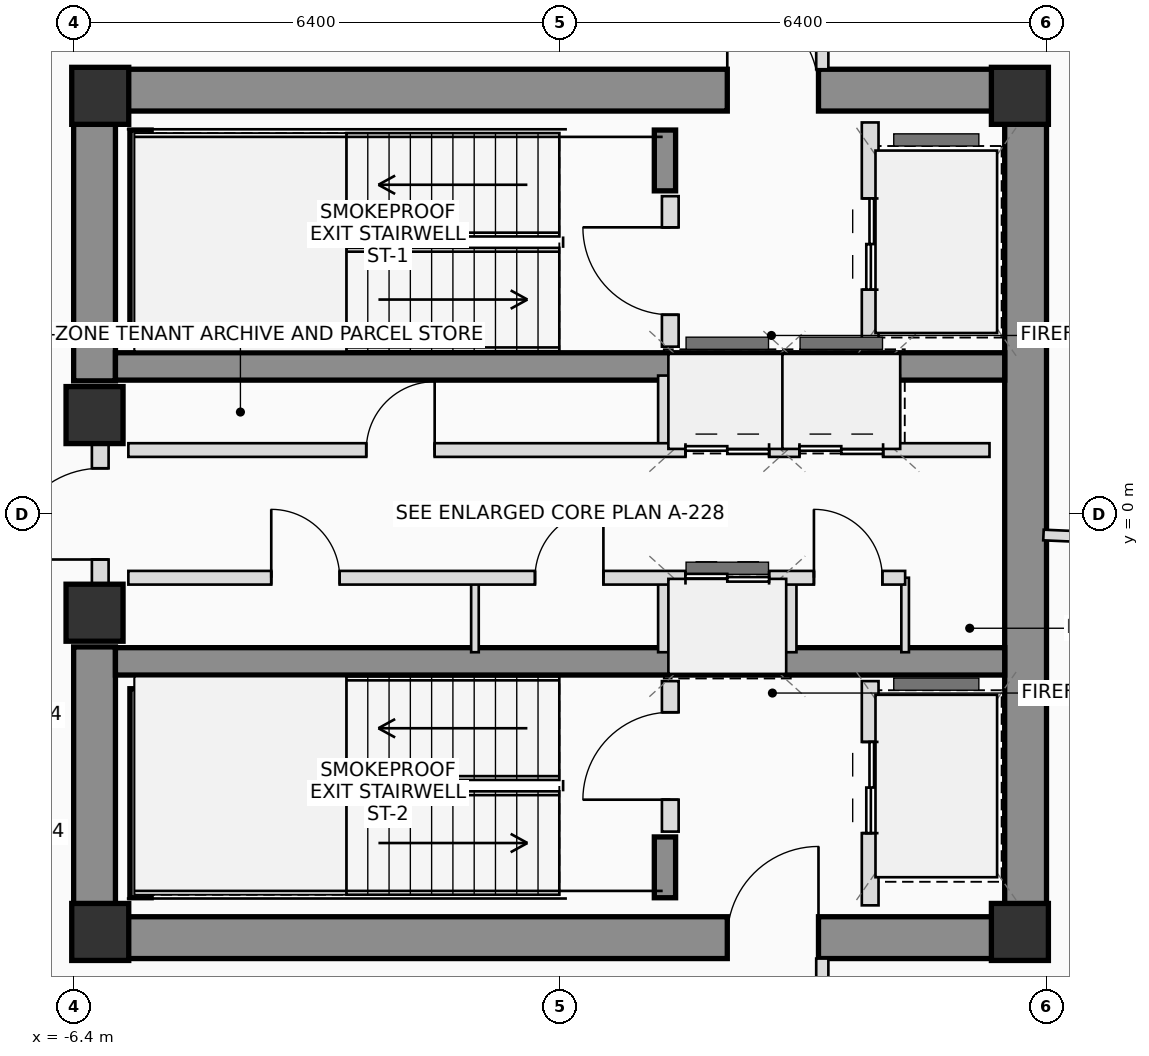
"""IFC4 building model, lengths in metres.
Left out: names, types, materials, properties, quantities, classifications, styles, units other than length and angle.
Written with IfcOpenShell. Run it as: python <this file> out.ifc"""

import sys

from ifc_helpers import new_model, si_unit, direction, frame, frame_2d, origin, origin_2d, place, context, subcontext, project, spatial, rectangle, extrude, source, transform, mapped, element, fill, save


model = new_model("IFC4")
c1 = context("Model", 3, precision=1e-05, world=origin(), true_north=direction((0.0, 1.0)))
c2 = subcontext(c1, "Body", "Model", "MODEL_VIEW")
j1 = project(units=[si_unit("LENGTHUNIT", "METRE"), si_unit("PLANEANGLEUNIT", "RADIAN")], contexts=[c1])
p1 = place(None, origin())
s1 = spatial("IfcSite", under=j1, at=p1, CompositionType="ELEMENT")
p2 = place(p1, origin())
s2 = spatial("IfcBuilding", under=s1, at=p2, CompositionType="ELEMENT")
p3 = place(p2, frame((0.0, 0.0, 314.0)))
s3 = spatial("IfcBuildingStorey", under=s2, at=p3, CompositionType="ELEMENT", Elevation=314.0)
m1 = source(origin(), c2, "Body", "SweptSolid", [
    extrude(rectangle(XDim=0.75, YDim=0.75, at=origin_2d()), origin(), (0.0, 0.0, 1.0), 3.45),
])
for number, where, z_axis, x_axis in (
    (1, (-6.05, -5.5, 0.0), (0.0, 0.0, 1.0), (1.0, 0.0, 0.0)),
    (2, (6.05, -5.5, 0.0), (0.0, 0.0, 1.0), (1.0, 0.0, 0.0)),
    (3, (6.05, 5.5, 0.0), (0.0, 0.0, 1.0), (1.0, 0.0, 0.0)),
    (4, (-6.05, 5.5, 0.0), (0.0, 0.0, 1.0), (1.0, 0.0, 0.0)),
):
    element("IfcColumn", number, at=place(p3, frame(where, z_axis=z_axis, x_axis=x_axis)), inside=s3, PredefinedType="COLUMN", context=c2, shape_type="MappedRepresentation", body=[
        mapped(m1, transform((0.0, 0.0, 0.0), scale=1.0)),
    ])
p4 = place(p3, frame((-6.4, 5.575, 0.0), z_axis=(0.0, 0.0, 1.0), x_axis=(1.0, 0.0, 0.0)))
e5 = element("IfcWall", 5, at=p4, inside=s3, PredefinedType="SHEAR", context=c2, shape_type="SweptSolid", body=[
    extrude(rectangle(XDim=12.8, YDim=0.55, at=frame_2d((6.4, 0.0))), origin(), (0.0, 0.0, 1.0), 3.45),
])
p5 = place(p4, frame((8.6, 0.0, 0.0)))
e6 = element("IfcOpeningElement", 6, at=p5, cuts=e5, PredefinedType="OPENING", context=c2, shape_type="SweptSolid", body=[
    extrude(rectangle(XDim=1.2, YDim=2.2, at=frame_2d((0.6, 1.1))), frame((0.0, 0.285, 0.0), z_axis=(0.0, -1.0, 0.0), x_axis=(1.0, 0.0, 0.0)), (0.0, 0.0, 1.0), 0.57),
])
p6 = place(p3, frame((-6.4, -5.575, 0.0), z_axis=(0.0, 0.0, 1.0), x_axis=(1.0, 0.0, 0.0)))
e7 = element("IfcWall", 7, at=p6, inside=s3, PredefinedType="SHEAR", context=c2, shape_type="SweptSolid", body=[
    extrude(rectangle(XDim=12.8, YDim=0.55, at=frame_2d((6.4, 0.0))), origin(), (0.0, 0.0, 1.0), 3.45),
])
p7 = place(p6, frame((8.6, 0.0, 0.0)))
e8 = element("IfcOpeningElement", 8, at=p7, cuts=e7, PredefinedType="OPENING", context=c2, shape_type="SweptSolid", body=[
    extrude(rectangle(XDim=1.2, YDim=2.2, at=frame_2d((0.6, 1.1))), frame((0.0, 0.285, 0.0), z_axis=(0.0, -1.0, 0.0), x_axis=(1.0, 0.0, 0.0)), (0.0, 0.0, 1.0), 0.57),
])
p8 = place(p3, frame((6.125, -5.3, 0.0), z_axis=(0.0, 0.0, 1.0), x_axis=(0.0, 1.0, 0.0)))
e9 = element("IfcWall", 9, at=p8, inside=s3, PredefinedType="SHEAR", context=c2, shape_type="SweptSolid", body=[
    extrude(rectangle(XDim=10.6, YDim=0.55, at=frame_2d((5.3, 0.0))), origin(), (0.0, 0.0, 1.0), 3.45),
])
for number, where, z_axis, x_axis in (
    (10, (-6.125, -5.3, 0.0), (0.0, 0.0, 1.0), (0.0, 1.0, 0.0)),
    (11, (-6.125, 1.75, 0.0), (0.0, 0.0, 1.0), (0.0, 1.0, 0.0)),
):
    element("IfcWall", number, at=place(p3, frame(where, z_axis=z_axis, x_axis=x_axis)), inside=s3, PredefinedType="SHEAR", context=c2, shape_type="SweptSolid", body=[
        extrude(rectangle(XDim=3.55, YDim=0.55, at=frame_2d((1.775, 0.0))), origin(), (0.0, 0.0, 1.0), 3.45),
    ])
for number, where, z_axis, x_axis in (
    (12, (-5.85, 1.94, 0.0), (0.0, 0.0, 1.0), (1.0, 0.0, 0.0)),
    (13, (-5.85, -1.94, 0.0), (0.0, 0.0, 1.0), (1.0, 0.0, 0.0)),
):
    element("IfcWall", number, at=place(p3, frame(where, z_axis=z_axis, x_axis=x_axis)), inside=s3, PredefinedType="SHEAR", context=c2, shape_type="SweptSolid", body=[
        extrude(rectangle(XDim=11.7, YDim=0.36, at=frame_2d((5.85, 0.0))), origin(), (0.0, 0.0, 1.0), 3.45),
    ])
p9 = place(p3, frame((-5.52, 2.3, 0.0), z_axis=(0.0, 0.0, 1.0), x_axis=(0.0, 1.0, 0.0)))
e14 = element("IfcWall", 14, at=p9, inside=s3, PredefinedType="SHEAR", context=c2, shape_type="SweptSolid", body=[
    extrude(rectangle(XDim=2.75, YDim=0.28, at=frame_2d((1.375, 0.0))), origin(), (0.0, 0.0, 1.0), 3.45),
])
p10 = place(p3, frame((1.38, 4.25, 0.0), z_axis=(0.0, 0.0, 1.0), x_axis=(0.0, 1.0, 0.0)))
e15 = element("IfcWall", 15, at=p10, inside=s3, PredefinedType="SHEAR", context=c2, shape_type="SweptSolid", body=[
    extrude(rectangle(XDim=0.8, YDim=0.28, at=frame_2d((0.4, 0.0))), origin(), (0.0, 0.0, 1.0), 3.45),
])
p11 = place(p3, frame((-5.52, -5.05, 0.0), z_axis=(0.0, 0.0, 1.0), x_axis=(0.0, 1.0, 0.0)))
e16 = element("IfcWall", 16, at=p11, inside=s3, PredefinedType="SHEAR", context=c2, shape_type="SweptSolid", body=[
    extrude(rectangle(XDim=2.75, YDim=0.28, at=frame_2d((1.375, 0.0))), origin(), (0.0, 0.0, 1.0), 3.45),
])
p12 = place(p3, frame((1.38, -5.05, 0.0), z_axis=(0.0, 0.0, 1.0), x_axis=(0.0, 1.0, 0.0)))
e17 = element("IfcWall", 17, at=p12, inside=s3, PredefinedType="SHEAR", context=c2, shape_type="SweptSolid", body=[
    extrude(rectangle(XDim=0.8, YDim=0.28, at=frame_2d((0.4, 0.0))), origin(), (0.0, 0.0, 1.0), 3.45),
])
for number, where, z_axis, x_axis in (
    (18, (-6.125, -1.3, 0.0), (0.0, 0.0, 1.0), (1.0, 0.0, 0.0)),
    (19, (-6.125, 1.3, 0.0), (0.0, 0.0, 1.0), (1.0, 0.0, 0.0)),
):
    element("IfcColumn", number, at=place(p3, frame(where, z_axis=z_axis, x_axis=x_axis)), inside=s3, PredefinedType="COLUMN", context=c2, shape_type="MappedRepresentation", body=[
        mapped(m1, transform((0.0, 0.0, 0.0), scale=1.0)),
    ])
p13 = place(p3, frame((-6.05, -0.95, 0.0), z_axis=(0.0, 0.0, 1.0), x_axis=(0.0, 1.0, 0.0)))
e20 = element("IfcWall", 20, at=p13, inside=s3, PredefinedType="PLUMBINGWALL", context=c2, shape_type="SweptSolid", body=[
    extrude(rectangle(XDim=1.9, YDim=0.22, at=frame_2d((0.95, 0.0))), origin(), (0.0, 0.0, 1.0), 2.15),
])
p14 = place(p13, frame((0.35, 0.0, 0.0)))
e21 = element("IfcOpeningElement", 21, at=p14, cuts=e20, PredefinedType="OPENING", context=c2, shape_type="SweptSolid", body=[
    extrude(rectangle(XDim=1.2, YDim=2.2, at=frame_2d((0.6, 1.1))), frame((0.0, 0.12, 0.0), z_axis=(0.0, -1.0, 0.0), x_axis=(1.0, 0.0, 0.0)), (0.0, 0.0, 1.0), 0.24),
])
p15 = place(p3, frame((1.45, 2.2, 0.0), z_axis=(0.0, 0.0, 1.0), x_axis=(0.0, 1.0, 0.0)))
e22 = element("IfcWall", 22, at=p15, inside=s3, PredefinedType="PLUMBINGWALL", context=c2, shape_type="SweptSolid", body=[
    extrude(rectangle(XDim=1.98, YDim=0.22, at=frame_2d((0.99, 0.0))), origin(), (0.0, 0.0, 1.0), 3.17),
])
p16 = place(p15, frame((0.42, 0.0, 0.0)))
e23 = element("IfcOpeningElement", 23, at=p16, cuts=e22, PredefinedType="OPENING", context=c2, shape_type="SweptSolid", body=[
    extrude(rectangle(XDim=1.15, YDim=2.15, at=frame_2d((0.575, 1.075))), frame((0.0, 0.12, 0.0), z_axis=(0.0, -1.0, 0.0), x_axis=(1.0, 0.0, 0.0)), (0.0, 0.0, 1.0), 0.24),
])
p17 = place(p3, frame((4.08, 2.2, 0.0), z_axis=(0.0, 0.0, 1.0), x_axis=(0.0, 1.0, 0.0)))
e24 = element("IfcWall", 24, at=p17, inside=s3, PredefinedType="PLUMBINGWALL", context=c2, shape_type="SweptSolid", body=[
    extrude(rectangle(XDim=2.95, YDim=0.22, at=frame_2d((1.475, 0.0))), origin(), (0.0, 0.0, 1.0), 3.17),
])
p18 = place(p17, frame((0.75, 0.0, 0.0)))
e25 = element("IfcOpeningElement", 25, at=p18, cuts=e24, PredefinedType="OPENING", context=c2, shape_type="SweptSolid", body=[
    extrude(rectangle(XDim=1.2, YDim=2.25, at=frame_2d((0.6, 1.125))), frame((0.0, 0.12, 0.0), z_axis=(0.0, -1.0, 0.0), x_axis=(1.0, 0.0, 0.0)), (0.0, 0.0, 1.0), 0.24),
])
p19 = place(p3, frame((1.45, -4.18, 0.0), z_axis=(0.0, 0.0, 1.0), x_axis=(0.0, 1.0, 0.0)))
e26 = element("IfcWall", 26, at=p19, inside=s3, PredefinedType="PLUMBINGWALL", context=c2, shape_type="SweptSolid", body=[
    extrude(rectangle(XDim=1.98, YDim=0.22, at=frame_2d((0.99, 0.0))), origin(), (0.0, 0.0, 1.0), 3.17),
])
p20 = place(p19, frame((0.42, 0.0, 0.0)))
e27 = element("IfcOpeningElement", 27, at=p20, cuts=e26, PredefinedType="OPENING", context=c2, shape_type="SweptSolid", body=[
    extrude(rectangle(XDim=1.15, YDim=2.15, at=frame_2d((0.575, 1.075))), frame((0.0, 0.12, 0.0), z_axis=(0.0, -1.0, 0.0), x_axis=(1.0, 0.0, 0.0)), (0.0, 0.0, 1.0), 0.24),
])
p21 = place(p3, frame((4.08, -5.15, 0.0), z_axis=(0.0, 0.0, 1.0), x_axis=(0.0, 1.0, 0.0)))
e28 = element("IfcWall", 28, at=p21, inside=s3, PredefinedType="PLUMBINGWALL", context=c2, shape_type="SweptSolid", body=[
    extrude(rectangle(XDim=2.95, YDim=0.22, at=frame_2d((1.475, 0.0))), origin(), (0.0, 0.0, 1.0), 3.17),
])
p22 = place(p21, frame((0.95, 0.0, 0.0)))
e29 = element("IfcOpeningElement", 29, at=p22, cuts=e28, PredefinedType="OPENING", context=c2, shape_type="SweptSolid", body=[
    extrude(rectangle(XDim=1.2, YDim=2.25, at=frame_2d((0.6, 1.125))), frame((0.0, 0.12, 0.0), z_axis=(0.0, -1.0, 0.0), x_axis=(1.0, 0.0, 0.0)), (0.0, 0.0, 1.0), 0.24),
])
p23 = place(p3, frame((-1.12, -1.82, 0.0), z_axis=(0.0, 0.0, 1.0), x_axis=(0.0, 1.0, 0.0)))
e30 = element("IfcWall", 30, at=p23, inside=s3, PredefinedType="PARTITIONING", context=c2, shape_type="SweptSolid", body=[
    extrude(rectangle(XDim=0.98, YDim=0.1, at=frame_2d((0.49, 0.0))), origin(), (0.0, 0.0, 1.0), 3.17),
])
for number, where, z_axis, x_axis in (
    (31, (1.38, 0.84, 0.0), (0.0, 0.0, 1.0), (0.0, 1.0, 0.0)),
    (32, (1.38, -1.82, 0.0), (0.0, 0.0, 1.0), (0.0, 1.0, 0.0)),
    (33, (3.02, 0.84, 0.0), (0.0, 0.0, 1.0), (0.0, 1.0, 0.0)),
    (34, (4.38, 0.84, 0.0), (0.0, 0.0, 1.0), (0.0, 1.0, 0.0)),
    (35, (3.02, -1.82, 0.0), (0.0, 0.0, 1.0), (0.0, 1.0, 0.0)),
):
    element("IfcWall", number, at=place(p3, frame(where, z_axis=z_axis, x_axis=x_axis)), inside=s3, PredefinedType="PLUMBINGWALL", context=c2, shape_type="SweptSolid", body=[
        extrude(rectangle(XDim=0.98, YDim=0.18, at=frame_2d((0.49, 0.0))), origin(), (0.0, 0.0, 1.0), 3.17),
    ])
p24 = place(p3, frame((4.54, -1.82, 0.0), z_axis=(0.0, 0.0, 1.0), x_axis=(0.0, 1.0, 0.0)))
e36 = element("IfcWall", 36, at=p24, inside=s3, PredefinedType="PARTITIONING", context=c2, shape_type="SweptSolid", body=[
    extrude(rectangle(XDim=0.98, YDim=0.1, at=frame_2d((0.49, 0.0))), origin(), (0.0, 0.0, 1.0), 3.17),
])
p25 = place(p3, frame((-5.68, 0.84, 0.0), z_axis=(0.0, 0.0, 1.0), x_axis=(1.0, 0.0, 0.0)))
e37 = element("IfcWall", 37, at=p25, inside=s3, PredefinedType="PLUMBINGWALL", context=c2, shape_type="SweptSolid", body=[
    extrude(rectangle(XDim=11.33, YDim=0.18, at=frame_2d((5.665, 0.0))), origin(), (0.0, 0.0, 1.0), 3.17),
])
p26 = place(p25, frame((3.13, 0.0, 0.0)))
e38 = element("IfcOpeningElement", 38, at=p26, cuts=e37, PredefinedType="OPENING", context=c2, shape_type="SweptSolid", body=[
    extrude(rectangle(XDim=0.9, YDim=2.05, at=frame_2d((0.45, 1.025))), frame((0.0, 0.1, 0.0), z_axis=(0.0, -1.0, 0.0), x_axis=(1.0, 0.0, 0.0)), (0.0, 0.0, 1.0), 0.2),
])
p27 = place(p25, frame((7.33, 0.0, 0.0)))
e39 = element("IfcOpeningElement", 39, at=p27, cuts=e37, PredefinedType="OPENING", context=c2, shape_type="SweptSolid", body=[
    extrude(rectangle(XDim=1.1, YDim=2.2, at=frame_2d((0.55, 1.1))), frame((0.0, 0.1, 0.0), z_axis=(0.0, -1.0, 0.0), x_axis=(1.0, 0.0, 0.0)), (0.0, 0.0, 1.0), 0.2),
])
p28 = place(p25, frame((8.83, 0.0, 0.0)))
e40 = element("IfcOpeningElement", 40, at=p28, cuts=e37, PredefinedType="OPENING", context=c2, shape_type="SweptSolid", body=[
    extrude(rectangle(XDim=1.1, YDim=2.2, at=frame_2d((0.55, 1.1))), frame((0.0, 0.1, 0.0), z_axis=(0.0, -1.0, 0.0), x_axis=(1.0, 0.0, 0.0)), (0.0, 0.0, 1.0), 0.2),
])
p29 = place(p3, frame((-5.68, -0.84, 0.0), z_axis=(0.0, 0.0, 1.0), x_axis=(1.0, 0.0, 0.0)))
e41 = element("IfcWall", 41, at=p29, inside=s3, PredefinedType="PLUMBINGWALL", context=c2, shape_type="SweptSolid", body=[
    extrude(rectangle(XDim=10.22, YDim=0.18, at=frame_2d((5.11, 0.0))), origin(), (0.0, 0.0, 1.0), 3.17),
])
p30 = place(p29, frame((1.88, 0.0, 0.0)))
e42 = element("IfcOpeningElement", 42, at=p30, cuts=e41, PredefinedType="OPENING", context=c2, shape_type="SweptSolid", body=[
    extrude(rectangle(XDim=0.9, YDim=2.05, at=frame_2d((0.45, 1.025))), frame((0.0, 0.1, 0.0), z_axis=(0.0, -1.0, 0.0), x_axis=(1.0, 0.0, 0.0)), (0.0, 0.0, 1.0), 0.2),
])
p31 = place(p29, frame((5.35, 0.0, 0.0)))
e43 = element("IfcOpeningElement", 43, at=p31, cuts=e41, PredefinedType="OPENING", context=c2, shape_type="SweptSolid", body=[
    extrude(rectangle(XDim=0.9, YDim=2.05, at=frame_2d((0.45, 1.025))), frame((0.0, 0.1, 0.0), z_axis=(0.0, -1.0, 0.0), x_axis=(1.0, 0.0, 0.0)), (0.0, 0.0, 1.0), 0.2),
])
p32 = place(p29, frame((7.33, 0.0, 0.0)))
e44 = element("IfcOpeningElement", 44, at=p32, cuts=e41, PredefinedType="OPENING", context=c2, shape_type="SweptSolid", body=[
    extrude(rectangle(XDim=1.1, YDim=2.2, at=frame_2d((0.55, 1.1))), frame((0.0, 0.1, 0.0), z_axis=(0.0, -1.0, 0.0), x_axis=(1.0, 0.0, 0.0)), (0.0, 0.0, 1.0), 0.2),
])
p33 = place(p29, frame((9.02, 0.0, 0.0)))
e45 = element("IfcOpeningElement", 45, at=p33, cuts=e41, PredefinedType="OPENING", context=c2, shape_type="SweptSolid", body=[
    extrude(rectangle(XDim=0.9, YDim=2.05, at=frame_2d((0.45, 1.025))), frame((0.0, 0.1, 0.0), z_axis=(0.0, -1.0, 0.0), x_axis=(1.0, 0.0, 0.0)), (0.0, 0.0, 1.0), 0.2),
])
p34 = place(p3, frame((3.45, 7.425, 0.0), z_axis=(0.0, 0.0, 1.0), x_axis=(0.0, -1.0, 0.0)))
e46 = element("IfcWall", 46, at=p34, inside=s3, PredefinedType="PARTITIONING", context=c2, shape_type="SweptSolid", body=[
    extrude(rectangle(XDim=1.575, YDim=0.16, at=frame_2d((0.787, 0.0))), origin(), (0.0, 0.0, 1.0), 2.775),
])
p35 = place(p3, frame((3.45, -5.85, 0.0), z_axis=(0.0, 0.0, 1.0), x_axis=(0.0, -1.0, 0.0)))
e47 = element("IfcWall", 47, at=p35, inside=s3, PredefinedType="PARTITIONING", context=c2, shape_type="SweptSolid", body=[
    extrude(rectangle(XDim=1.575, YDim=0.16, at=frame_2d((0.787, 0.0))), origin(), (0.0, 0.0, 1.0), 2.775),
])
p36 = place(p35, frame((0.287, 0.0, 0.0)))
e48 = element("IfcOpeningElement", 48, at=p36, cuts=e47, PredefinedType="OPENING", context=c2, shape_type="SweptSolid", body=[
    extrude(rectangle(XDim=1.0, YDim=2.25, at=frame_2d((0.5, 1.125))), frame((0.0, 0.09, 0.0), z_axis=(0.0, -1.0, 0.0), x_axis=(1.0, 0.0, 0.0)), (0.0, 0.0, 1.0), 0.18),
])
p37 = place(p3, frame((6.36, -0.278, 0.0), z_axis=(0.0, 0.0, 1.0), x_axis=(0.999047623791, -0.043633076864, 0.0)))
e49 = element("IfcWall", 49, at=p37, inside=s3, PredefinedType="PARTITIONING", context=c2, shape_type="SweptSolid", body=[
    extrude(rectangle(XDim=13.524, YDim=0.14, at=frame_2d((6.762, 0.0))), origin(), (0.0, 0.0, 1.0), 2.735),
])
p38 = place(p5, origin())
e50 = element("IfcDoor", 50, at=p38, inside=s3, OperationType="SINGLE_SWING_LEFT", PredefinedType="DOOR", context=c2, shape_type="SweptSolid", body=[
    extrude(rectangle(XDim=1.2, YDim=2.2, at=frame_2d((0.6, 1.1))), frame((0.0, 0.025, 0.0), z_axis=(0.0, -1.0, 0.0), x_axis=(1.0, 0.0, 0.0)), (0.0, 0.0, 1.0), 0.05),
])
fill(e6, e50)
p39 = place(p7, origin())
e51 = element("IfcDoor", 51, at=p39, inside=s3, OperationType="SINGLE_SWING_RIGHT", PredefinedType="DOOR", context=c2, shape_type="SweptSolid", body=[
    extrude(rectangle(XDim=1.2, YDim=2.2, at=frame_2d((0.6, 1.1))), frame((0.0, 0.025, 0.0), z_axis=(0.0, -1.0, 0.0), x_axis=(1.0, 0.0, 0.0)), (0.0, 0.0, 1.0), 0.05),
])
fill(e8, e51)
p40 = place(p14, origin())
e52 = element("IfcDoor", 52, at=p40, inside=s3, OperationType="SINGLE_SWING_LEFT", PredefinedType="DOOR", context=c2, shape_type="SweptSolid", body=[
    extrude(rectangle(XDim=1.2, YDim=2.2, at=frame_2d((0.6, 1.1))), frame((0.0, 0.025, 0.0), z_axis=(0.0, -1.0, 0.0), x_axis=(1.0, 0.0, 0.0)), (0.0, 0.0, 1.0), 0.05),
])
fill(e21, e52)
p41 = place(p16, origin())
e53 = element("IfcDoor", 53, at=p41, inside=s3, OperationType="SINGLE_SWING_RIGHT", PredefinedType="DOOR", context=c2, shape_type="SweptSolid", body=[
    extrude(rectangle(XDim=1.15, YDim=2.15, at=frame_2d((0.575, 1.075))), frame((0.0, 0.025, 0.0), z_axis=(0.0, -1.0, 0.0), x_axis=(1.0, 0.0, 0.0)), (0.0, 0.0, 1.0), 0.05),
])
fill(e23, e53)
p42 = place(p18, origin())
e54 = element("IfcDoor", 54, at=p42, inside=s3, OperationType="DOUBLE_DOOR_SLIDING", PredefinedType="DOOR", context=c2, shape_type="SweptSolid", body=[
    extrude(rectangle(XDim=1.2, YDim=2.25, at=frame_2d((0.6, 1.125))), frame((0.0, 0.025, 0.0), z_axis=(0.0, -1.0, 0.0), x_axis=(1.0, 0.0, 0.0)), (0.0, 0.0, 1.0), 0.05),
])
fill(e25, e54)
p43 = place(p20, origin())
e55 = element("IfcDoor", 55, at=p43, inside=s3, OperationType="SINGLE_SWING_LEFT", PredefinedType="DOOR", context=c2, shape_type="SweptSolid", body=[
    extrude(rectangle(XDim=1.15, YDim=2.15, at=frame_2d((0.575, 1.075))), frame((0.0, 0.025, 0.0), z_axis=(0.0, -1.0, 0.0), x_axis=(1.0, 0.0, 0.0)), (0.0, 0.0, 1.0), 0.05),
])
fill(e27, e55)
p44 = place(p22, origin())
e56 = element("IfcDoor", 56, at=p44, inside=s3, OperationType="DOUBLE_DOOR_SLIDING", PredefinedType="DOOR", context=c2, shape_type="SweptSolid", body=[
    extrude(rectangle(XDim=1.2, YDim=2.25, at=frame_2d((0.6, 1.125))), frame((0.0, 0.025, 0.0), z_axis=(0.0, -1.0, 0.0), x_axis=(1.0, 0.0, 0.0)), (0.0, 0.0, 1.0), 0.05),
])
fill(e29, e56)
p45 = place(p26, origin())
e57 = element("IfcDoor", 57, at=p45, inside=s3, OperationType="SINGLE_SWING_RIGHT", PredefinedType="DOOR", context=c2, shape_type="SweptSolid", body=[
    extrude(rectangle(XDim=0.9, YDim=2.05, at=frame_2d((0.45, 1.025))), frame((0.0, 0.025, 0.0), z_axis=(0.0, -1.0, 0.0), x_axis=(1.0, 0.0, 0.0)), (0.0, 0.0, 1.0), 0.05),
])
fill(e38, e57)
p46 = place(p27, origin())
e58 = element("IfcDoor", 58, at=p46, inside=s3, OperationType="DOUBLE_DOOR_SLIDING", PredefinedType="DOOR", context=c2, shape_type="SweptSolid", body=[
    extrude(rectangle(XDim=1.1, YDim=2.2, at=frame_2d((0.55, 1.1))), frame((0.0, 0.025, 0.0), z_axis=(0.0, -1.0, 0.0), x_axis=(1.0, 0.0, 0.0)), (0.0, 0.0, 1.0), 0.05),
])
fill(e39, e58)
p47 = place(p28, origin())
e59 = element("IfcDoor", 59, at=p47, inside=s3, OperationType="DOUBLE_DOOR_SLIDING", PredefinedType="DOOR", context=c2, shape_type="SweptSolid", body=[
    extrude(rectangle(XDim=1.1, YDim=2.2, at=frame_2d((0.55, 1.1))), frame((0.0, 0.025, 0.0), z_axis=(0.0, -1.0, 0.0), x_axis=(1.0, 0.0, 0.0)), (0.0, 0.0, 1.0), 0.05),
])
fill(e40, e59)
p48 = place(p30, origin())
e60 = element("IfcDoor", 60, at=p48, inside=s3, OperationType="SINGLE_SWING_LEFT", PredefinedType="DOOR", context=c2, shape_type="SweptSolid", body=[
    extrude(rectangle(XDim=0.9, YDim=2.05, at=frame_2d((0.45, 1.025))), frame((0.0, 0.025, 0.0), z_axis=(0.0, -1.0, 0.0), x_axis=(1.0, 0.0, 0.0)), (0.0, 0.0, 1.0), 0.05),
])
fill(e42, e60)
p49 = place(p31, origin())
e61 = element("IfcDoor", 61, at=p49, inside=s3, OperationType="SINGLE_SWING_RIGHT", PredefinedType="DOOR", context=c2, shape_type="SweptSolid", body=[
    extrude(rectangle(XDim=0.9, YDim=2.05, at=frame_2d((0.45, 1.025))), frame((0.0, 0.025, 0.0), z_axis=(0.0, -1.0, 0.0), x_axis=(1.0, 0.0, 0.0)), (0.0, 0.0, 1.0), 0.05),
])
fill(e43, e61)
p50 = place(p32, origin())
e62 = element("IfcDoor", 62, at=p50, inside=s3, OperationType="DOUBLE_DOOR_SLIDING", PredefinedType="DOOR", context=c2, shape_type="SweptSolid", body=[
    extrude(rectangle(XDim=1.1, YDim=2.2, at=frame_2d((0.55, 1.1))), frame((0.0, 0.025, 0.0), z_axis=(0.0, -1.0, 0.0), x_axis=(1.0, 0.0, 0.0)), (0.0, 0.0, 1.0), 0.05),
])
fill(e44, e62)
p51 = place(p33, origin())
e63 = element("IfcDoor", 63, at=p51, inside=s3, OperationType="SINGLE_SWING_LEFT", PredefinedType="DOOR", context=c2, shape_type="SweptSolid", body=[
    extrude(rectangle(XDim=0.9, YDim=2.05, at=frame_2d((0.45, 1.025))), frame((0.0, 0.025, 0.0), z_axis=(0.0, -1.0, 0.0), x_axis=(1.0, 0.0, 0.0)), (0.0, 0.0, 1.0), 0.05),
])
fill(e45, e63)
save(model, sys.argv[1])
